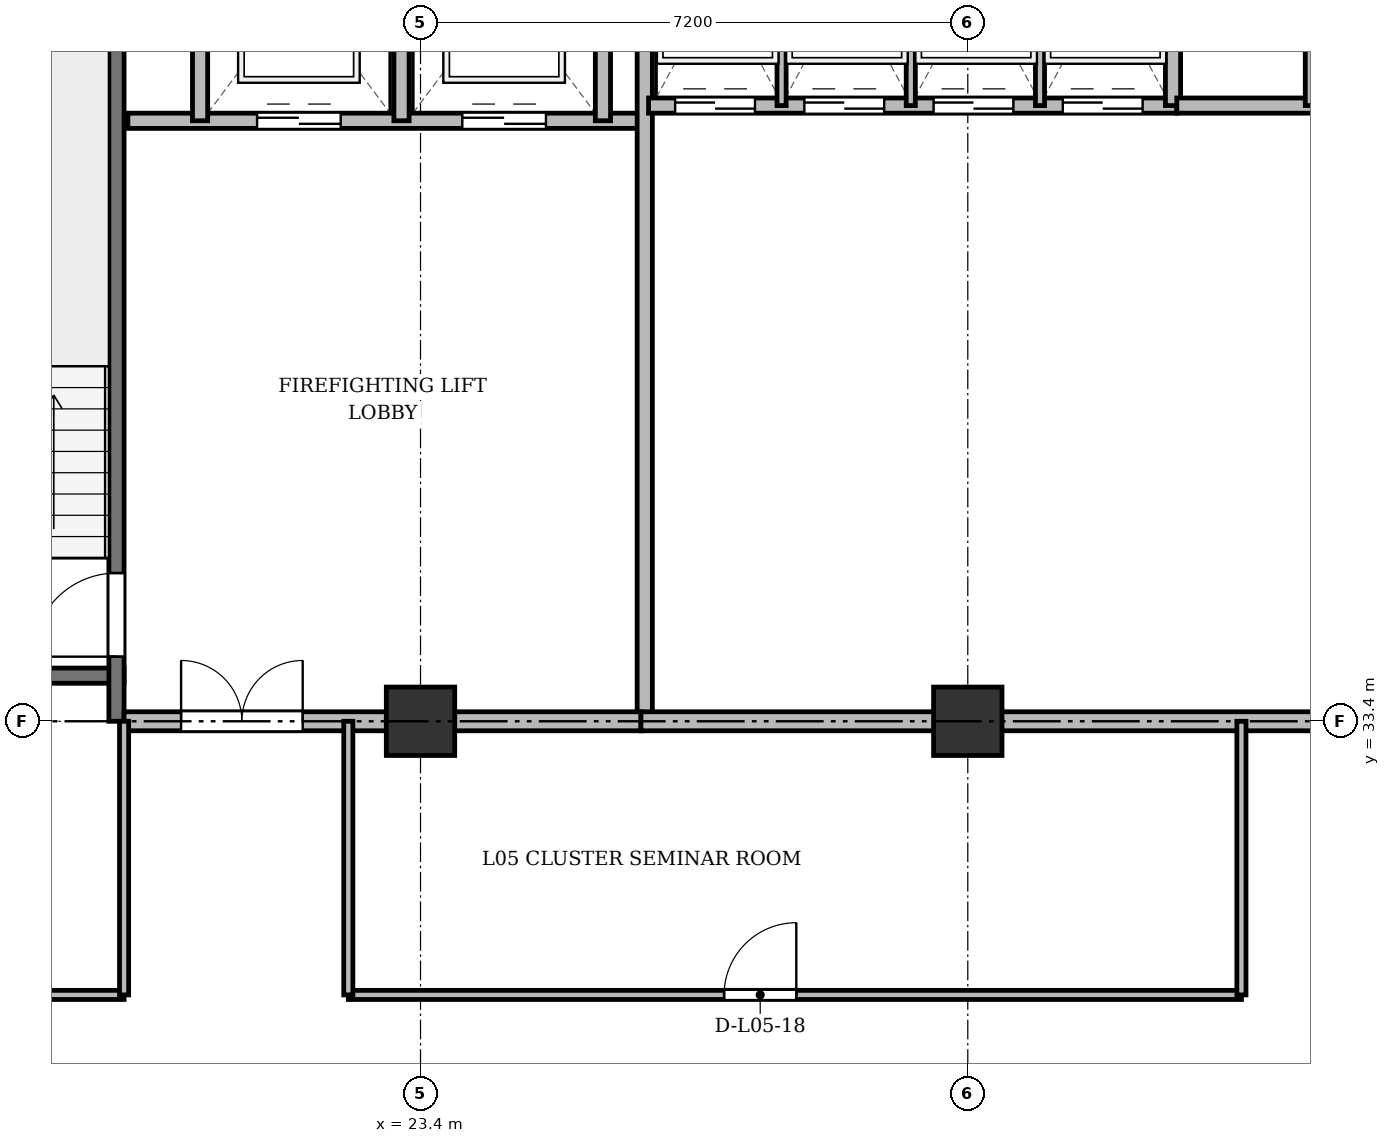
"""IFC4 building model, lengths in metres.
Left out: names, types, materials, properties, quantities, classifications, styles, units other than length and angle.
Written with IfcOpenShell. Run it as: python <this file> out.ifc"""

import sys

from ifc_helpers import new_model, si_unit, direction, frame, frame_2d, origin, origin_2d, place, context, subcontext, project, spatial, rectangle, extrude, source, transform, mapped, element, fill, save


model = new_model("IFC4")
c1 = context("Model", 3, precision=1e-05, world=origin(), true_north=direction((0.0, 1.0)))
c2 = subcontext(c1, "Body", "Model", "MODEL_VIEW")
j1 = project(units=[si_unit("LENGTHUNIT", "METRE"), si_unit("PLANEANGLEUNIT", "RADIAN")], contexts=[c1])
p1 = place(None, origin())
s1 = spatial("IfcSite", under=j1, at=p1, CompositionType="ELEMENT")
p2 = place(p1, origin())
s2 = spatial("IfcBuilding", under=s1, at=p2, CompositionType="ELEMENT")
p3 = place(p2, frame((0.0, 0.0, 23.5)))
s3 = spatial("IfcBuildingStorey", under=s2, at=p3, CompositionType="ELEMENT", Elevation=23.5)
m1 = source(origin(), c2, "Body", "SweptSolid", [
    extrude(rectangle(XDim=0.9, YDim=0.9, at=origin_2d()), origin(), (0.0, 0.0, 1.0), 3.6),
])
for number, where, z_axis, x_axis in (
    (1, (23.4, 33.4, 0.0), (0.0, 0.0, 1.0), (1.0, 0.0, 0.0)),
    (2, (30.6, 33.4, 0.0), (0.0, 0.0, 1.0), (1.0, 0.0, 0.0)),
):
    element("IfcColumn", number, at=place(p3, frame(where, z_axis=z_axis, x_axis=x_axis)), inside=s3, PredefinedType="COLUMN", context=c2, shape_type="MappedRepresentation", body=[
        mapped(m1, transform((0.0, 0.0, 0.0), x_axis=(1.0, 0.0, 0.0), y_axis=(0.0, 1.0, 0.0), z_axis=(0.0, 0.0, 1.0), scale=1.0)),
    ])
p4 = place(p3, frame((16.1, 34.0, 0.0), z_axis=(0.0, 0.0, 1.0), x_axis=(1.0, 0.0, 0.0)))
e3 = element("IfcWall", 3, at=p4, inside=s3, PredefinedType="SHEAR", context=c2, shape_type="SweptSolid", body=[
    extrude(rectangle(XDim=3.4, YDim=0.2, at=frame_2d((1.7, 0.0))), origin(), (0.0, 0.0, 1.0), 3.34),
])
p5 = place(p3, frame((19.4, 33.4, 0.0), z_axis=(0.0, 0.0, 1.0), x_axis=(0.0, 1.0, 0.0)))
e4 = element("IfcWall", 4, at=p5, inside=s3, PredefinedType="SHEAR", context=c2, shape_type="SweptSolid", body=[
    extrude(rectangle(XDim=11.1, YDim=0.2, at=frame_2d((5.55, 0.0))), origin(), (0.0, 0.0, 1.0), 3.34),
])
p6 = place(p5, frame((0.85, 0.0, 0.0)))
e5 = element("IfcOpeningElement", 5, at=p6, cuts=e4, PredefinedType="OPENING", context=c2, shape_type="SweptSolid", body=[
    extrude(rectangle(XDim=1.1, YDim=2.15, at=frame_2d((0.55, 1.075))), frame((0.0, 0.11, 0.0), z_axis=(0.0, -1.0, 0.0), x_axis=(1.0, 0.0, 0.0)), (0.0, 0.0, 1.0), 0.22),
])
p7 = place(p3, frame((19.55, 41.3, 0.0), z_axis=(0.0, 0.0, 1.0), x_axis=(1.0, 0.0, 0.0)))
e6 = element("IfcWall", 6, at=p7, inside=s3, PredefinedType="SOLIDWALL", context=c2, shape_type="SweptSolid", body=[
    extrude(rectangle(XDim=6.75, YDim=0.2, at=frame_2d((3.375, 0.0))), origin(), (0.0, 0.0, 1.0), 3.34),
])
p8 = place(p7, frame((1.7, 0.0, 0.0)))
e7 = element("IfcOpeningElement", 7, at=p8, cuts=e6, PredefinedType="OPENING", context=c2, shape_type="SweptSolid", body=[
    extrude(rectangle(XDim=1.1, YDim=2.15, at=frame_2d((0.55, 1.075))), frame((0.0, 0.11, 0.0), z_axis=(0.0, -1.0, 0.0), x_axis=(1.0, 0.0, 0.0)), (0.0, 0.0, 1.0), 0.22),
])
p9 = place(p7, frame((4.4, 0.0, 0.0)))
e8 = element("IfcOpeningElement", 8, at=p9, cuts=e6, PredefinedType="OPENING", context=c2, shape_type="SweptSolid", body=[
    extrude(rectangle(XDim=1.1, YDim=2.15, at=frame_2d((0.55, 1.075))), frame((0.0, 0.11, 0.0), z_axis=(0.0, -1.0, 0.0), x_axis=(1.0, 0.0, 0.0)), (0.0, 0.0, 1.0), 0.22),
])
for number, where, z_axis, x_axis in (
    (9, (20.5, 41.3, 0.0), (0.0, 0.0, 1.0), (0.0, 1.0, 0.0)),
    (10, (23.15, 41.3, 0.0), (0.0, 0.0, 1.0), (0.0, 1.0, 0.0)),
    (11, (25.8, 41.3, 0.0), (0.0, 0.0, 1.0), (0.0, 1.0, 0.0)),
):
    element("IfcWall", number, at=place(p3, frame(where, z_axis=z_axis, x_axis=x_axis)), inside=s3, PredefinedType="SOLIDWALL", context=c2, shape_type="SweptSolid", body=[
        extrude(rectangle(XDim=3.4, YDim=0.2, at=frame_2d((1.7, 0.0))), origin(), (0.0, 0.0, 1.0), 3.34),
    ])
p10 = place(p3, frame((26.35, 33.4, 0.0), z_axis=(0.0, 0.0, 1.0), x_axis=(0.0, 1.0, 0.0)))
e12 = element("IfcWall", 12, at=p10, inside=s3, PredefinedType="SOLIDWALL", context=c2, shape_type="SweptSolid", body=[
    extrude(rectangle(XDim=11.3, YDim=0.2, at=frame_2d((5.65, 0.0))), origin(), (0.0, 0.0, 1.0), 2.69),
])
p11 = place(p3, frame((19.5, 33.4, 0.0), z_axis=(0.0, 0.0, 1.0), x_axis=(1.0, 0.0, 0.0)))
e13 = element("IfcWall", 13, at=p11, inside=s3, PredefinedType="PARTITIONING", context=c2, shape_type="SweptSolid", body=[
    extrude(rectangle(XDim=6.8, YDim=0.25, at=frame_2d((3.4, 0.0))), origin(), (0.0, 0.0, 1.0), 2.69),
])
p12 = place(p11, frame((0.75, 0.0, 0.0)))
e14 = element("IfcOpeningElement", 14, at=p12, cuts=e13, PredefinedType="OPENING", context=c2, shape_type="SweptSolid", body=[
    extrude(rectangle(XDim=1.6, YDim=2.2, at=frame_2d((0.8, 1.1))), frame((0.0, 0.135, 0.0), z_axis=(0.0, -1.0, 0.0), x_axis=(1.0, 0.0, 0.0)), (0.0, 0.0, 1.0), 0.27),
])
p13 = place(p3, frame((26.4, 41.5, 0.0), z_axis=(0.0, 0.0, 1.0), x_axis=(1.0, 0.0, 0.0)))
e15 = element("IfcWall", 15, at=p13, inside=s3, PredefinedType="SOLIDWALL", context=c2, shape_type="SweptSolid", body=[
    extrude(rectangle(XDim=6.95, YDim=0.2, at=frame_2d((3.475, 0.0))), origin(), (0.0, 0.0, 1.0), 3.34),
])
p14 = place(p13, frame((0.35, 0.0, 0.0)))
e16 = element("IfcOpeningElement", 16, at=p14, cuts=e15, PredefinedType="OPENING", context=c2, shape_type="SweptSolid", body=[
    extrude(rectangle(XDim=1.05, YDim=2.15, at=frame_2d((0.525, 1.075))), frame((0.0, 0.11, 0.0), z_axis=(0.0, -1.0, 0.0), x_axis=(1.0, 0.0, 0.0)), (0.0, 0.0, 1.0), 0.22),
])
p15 = place(p13, frame((2.05, 0.0, 0.0)))
e17 = element("IfcOpeningElement", 17, at=p15, cuts=e15, PredefinedType="OPENING", context=c2, shape_type="SweptSolid", body=[
    extrude(rectangle(XDim=1.05, YDim=2.15, at=frame_2d((0.525, 1.075))), frame((0.0, 0.11, 0.0), z_axis=(0.0, -1.0, 0.0), x_axis=(1.0, 0.0, 0.0)), (0.0, 0.0, 1.0), 0.22),
])
p16 = place(p13, frame((3.75, 0.0, 0.0)))
e18 = element("IfcOpeningElement", 18, at=p16, cuts=e15, PredefinedType="OPENING", context=c2, shape_type="SweptSolid", body=[
    extrude(rectangle(XDim=1.05, YDim=2.15, at=frame_2d((0.525, 1.075))), frame((0.0, 0.11, 0.0), z_axis=(0.0, -1.0, 0.0), x_axis=(1.0, 0.0, 0.0)), (0.0, 0.0, 1.0), 0.22),
])
p17 = place(p13, frame((5.45, 0.0, 0.0)))
e19 = element("IfcOpeningElement", 19, at=p17, cuts=e15, PredefinedType="OPENING", context=c2, shape_type="SweptSolid", body=[
    extrude(rectangle(XDim=1.05, YDim=2.15, at=frame_2d((0.525, 1.075))), frame((0.0, 0.11, 0.0), z_axis=(0.0, -1.0, 0.0), x_axis=(1.0, 0.0, 0.0)), (0.0, 0.0, 1.0), 0.22),
])
p18 = place(p3, frame((33.3, 41.5, 0.0), z_axis=(0.0, 0.0, 1.0), x_axis=(0.0, 1.0, 0.0)))
e20 = element("IfcWall", 20, at=p18, inside=s3, PredefinedType="SOLIDWALL", context=c2, shape_type="SweptSolid", body=[
    extrude(rectangle(XDim=3.2, YDim=0.2, at=frame_2d((1.6, 0.0))), origin(), (0.0, 0.0, 1.0), 3.34),
])
for number, where, z_axis, x_axis in (
    (21, (28.15, 41.5, 0.0), (0.0, 0.0, 1.0), (0.0, 1.0, 0.0)),
    (22, (29.85, 41.5, 0.0), (0.0, 0.0, 1.0), (0.0, 1.0, 0.0)),
    (23, (31.55, 41.5, 0.0), (0.0, 0.0, 1.0), (0.0, 1.0, 0.0)),
):
    element("IfcWall", number, at=place(p3, frame(where, z_axis=z_axis, x_axis=x_axis)), inside=s3, PredefinedType="PARTITIONING", context=c2, shape_type="SweptSolid", body=[
        extrude(rectangle(XDim=3.2, YDim=0.12, at=frame_2d((1.6, 0.0))), origin(), (0.0, 0.0, 1.0), 3.34),
    ])
p19 = place(p3, frame((33.35, 41.5, 0.0), z_axis=(0.0, 0.0, 1.0), x_axis=(1.0, 0.0, 0.0)))
e24 = element("IfcWall", 24, at=p19, inside=s3, PredefinedType="SOLIDWALL", context=c2, shape_type="SweptSolid", body=[
    extrude(rectangle(XDim=6.9, YDim=0.2, at=frame_2d((3.45, 0.0))), origin(), (0.0, 0.0, 1.0), 3.34),
])
p20 = place(p3, frame((35.1, 41.5, 0.0), z_axis=(0.0, 0.0, 1.0), x_axis=(0.0, 1.0, 0.0)))
e25 = element("IfcWall", 25, at=p20, inside=s3, PredefinedType="PARTITIONING", context=c2, shape_type="SweptSolid", body=[
    extrude(rectangle(XDim=3.2, YDim=0.12, at=frame_2d((1.6, 0.0))), origin(), (0.0, 0.0, 1.0), 3.34),
])
p21 = place(p3, frame((26.3, 33.4, 0.0), z_axis=(0.0, 0.0, 1.0), x_axis=(1.0, 0.0, 0.0)))
e26 = element("IfcWall", 26, at=p21, inside=s3, PredefinedType="PARTITIONING", context=c2, shape_type="SweptSolid", body=[
    extrude(rectangle(XDim=20.85, YDim=0.25, at=frame_2d((10.425, 0.0))), origin(), (0.0, 0.0, 1.0), 2.69),
])
p22 = place(p21, frame((9.2, 0.0, 0.0)))
e27 = element("IfcOpeningElement", 27, at=p22, cuts=e26, PredefinedType="OPENING", context=c2, shape_type="SweptSolid", body=[
    extrude(rectangle(XDim=1.6, YDim=2.2, at=frame_2d((0.8, 1.1))), frame((0.0, 0.135, 0.0), z_axis=(0.0, -1.0, 0.0), x_axis=(1.0, 0.0, 0.0)), (0.0, 0.0, 1.0), 0.27),
])
p23 = place(p3, frame((4.75, 29.8, 0.0), z_axis=(0.0, 0.0, 1.0), x_axis=(1.0, 0.0, 0.0)))
e28 = element("IfcWall", 28, at=p23, inside=s3, PredefinedType="PARTITIONING", context=c2, shape_type="SweptSolid", body=[
    extrude(rectangle(XDim=14.75, YDim=0.12, at=frame_2d((7.375, 0.0))), origin(), (0.0, 0.0, 1.0), 2.752),
])
p24 = place(p23, frame((6.9, 0.0, 0.0)))
e29 = element("IfcOpeningElement", 29, at=p24, cuts=e28, PredefinedType="OPENING", context=c2, shape_type="SweptSolid", body=[
    extrude(rectangle(XDim=0.95, YDim=2.15, at=frame_2d((0.475, 1.075))), frame((0.0, 0.07, 0.0), z_axis=(0.0, -1.0, 0.0), x_axis=(1.0, 0.0, 0.0)), (0.0, 0.0, 1.0), 0.14),
])
p25 = place(p3, frame((22.45, 29.8, 0.0), z_axis=(0.0, 0.0, 1.0), x_axis=(1.0, 0.0, 0.0)))
e30 = element("IfcWall", 30, at=p25, inside=s3, PredefinedType="PARTITIONING", context=c2, shape_type="SweptSolid", body=[
    extrude(rectangle(XDim=11.75, YDim=0.12, at=frame_2d((5.875, 0.0))), origin(), (0.0, 0.0, 1.0), 2.752),
])
p26 = place(p25, frame((4.944, 0.0, 0.0)))
e31 = element("IfcOpeningElement", 31, at=p26, cuts=e30, PredefinedType="OPENING", context=c2, shape_type="SweptSolid", body=[
    extrude(rectangle(XDim=0.95, YDim=2.15, at=frame_2d((0.475, 1.075))), frame((0.0, 0.07, 0.0), z_axis=(0.0, -1.0, 0.0), x_axis=(1.0, 0.0, 0.0)), (0.0, 0.0, 1.0), 0.14),
])
for number, where, z_axis, x_axis in (
    (32, (19.5, 29.8, 0.0), (0.0, 0.0, 1.0), (0.0, 1.0, 0.0)),
    (33, (22.45, 29.8, 0.0), (0.0, 0.0, 1.0), (0.0, 1.0, 0.0)),
    (34, (34.2, 29.8, 0.0), (0.0, 0.0, 1.0), (0.0, 1.0, 0.0)),
):
    element("IfcWall", number, at=place(p3, frame(where, z_axis=z_axis, x_axis=x_axis)), inside=s3, PredefinedType="PARTITIONING", context=c2, shape_type="SweptSolid", body=[
        extrude(rectangle(XDim=3.6, YDim=0.12, at=frame_2d((1.8, 0.0))), origin(), (0.0, 0.0, 1.0), 2.69),
    ])
m2 = source(origin(), c2, "Body", "SweptSolid", [
    extrude(rectangle(XDim=1.1, YDim=2.15, at=frame_2d((0.55, 1.075))), frame((0.0, 0.025, 0.0), z_axis=(0.0, -1.0, 0.0), x_axis=(1.0, 0.0, 0.0)), (0.0, 0.0, 1.0), 0.05),
])
p27 = place(p6, origin())
e35 = element("IfcDoor", 35, at=p27, inside=s3, OperationType="SINGLE_SWING_LEFT", PredefinedType="DOOR", context=c2, shape_type="MappedRepresentation", body=[
    mapped(m2, transform((0.0, 0.0, 0.0), x_axis=(1.0, 0.0, 0.0), y_axis=(0.0, 1.0, 0.0), z_axis=(0.0, 0.0, 1.0), scale=1.0)),
])
fill(e5, e35)
p28 = place(p8, origin())
e36 = element("IfcDoor", 36, at=p28, inside=s3, OperationType="DOUBLE_DOOR_SLIDING", PredefinedType="DOOR", context=c2, shape_type="MappedRepresentation", body=[
    mapped(m2, transform((0.0, 0.0, 0.0), x_axis=(1.0, 0.0, 0.0), y_axis=(0.0, 1.0, 0.0), z_axis=(0.0, 0.0, 1.0), scale=1.0)),
])
fill(e7, e36)
p29 = place(p9, origin())
e37 = element("IfcDoor", 37, at=p29, inside=s3, OperationType="DOUBLE_DOOR_SLIDING", PredefinedType="DOOR", context=c2, shape_type="MappedRepresentation", body=[
    mapped(m2, transform((0.0, 0.0, 0.0), x_axis=(1.0, 0.0, 0.0), y_axis=(0.0, 1.0, 0.0), z_axis=(0.0, 0.0, 1.0), scale=1.0)),
])
fill(e8, e37)
m3 = source(origin(), c2, "Body", "SweptSolid", [
    extrude(rectangle(XDim=1.6, YDim=2.2, at=frame_2d((0.8, 1.1))), frame((0.0, 0.025, 0.0), z_axis=(0.0, -1.0, 0.0), x_axis=(1.0, 0.0, 0.0)), (0.0, 0.0, 1.0), 0.05),
])
p30 = place(p12, origin())
e38 = element("IfcDoor", 38, at=p30, inside=s3, OperationType="DOUBLE_DOOR_SINGLE_SWING", PredefinedType="DOOR", context=c2, shape_type="MappedRepresentation", body=[
    mapped(m3, transform((0.0, 0.0, 0.0), x_axis=(1.0, 0.0, 0.0), y_axis=(0.0, 1.0, 0.0), z_axis=(0.0, 0.0, 1.0), scale=1.0)),
])
fill(e14, e38)
m4 = source(origin(), c2, "Body", "SweptSolid", [
    extrude(rectangle(XDim=1.05, YDim=2.15, at=frame_2d((0.525, 1.075))), frame((0.0, 0.025, 0.0), z_axis=(0.0, -1.0, 0.0), x_axis=(1.0, 0.0, 0.0)), (0.0, 0.0, 1.0), 0.05),
])
p31 = place(p14, origin())
e39 = element("IfcDoor", 39, at=p31, inside=s3, OperationType="DOUBLE_DOOR_SLIDING", PredefinedType="DOOR", context=c2, shape_type="MappedRepresentation", body=[
    mapped(m4, transform((0.0, 0.0, 0.0), x_axis=(1.0, 0.0, 0.0), y_axis=(0.0, 1.0, 0.0), z_axis=(0.0, 0.0, 1.0), scale=1.0)),
])
fill(e16, e39)
p32 = place(p15, origin())
e40 = element("IfcDoor", 40, at=p32, inside=s3, OperationType="DOUBLE_DOOR_SLIDING", PredefinedType="DOOR", context=c2, shape_type="MappedRepresentation", body=[
    mapped(m4, transform((0.0, 0.0, 0.0), x_axis=(1.0, 0.0, 0.0), y_axis=(0.0, 1.0, 0.0), z_axis=(0.0, 0.0, 1.0), scale=1.0)),
])
fill(e17, e40)
p33 = place(p16, origin())
e41 = element("IfcDoor", 41, at=p33, inside=s3, OperationType="DOUBLE_DOOR_SLIDING", PredefinedType="DOOR", context=c2, shape_type="MappedRepresentation", body=[
    mapped(m4, transform((0.0, 0.0, 0.0), x_axis=(1.0, 0.0, 0.0), y_axis=(0.0, 1.0, 0.0), z_axis=(0.0, 0.0, 1.0), scale=1.0)),
])
fill(e18, e41)
p34 = place(p17, origin())
e42 = element("IfcDoor", 42, at=p34, inside=s3, OperationType="DOUBLE_DOOR_SLIDING", PredefinedType="DOOR", context=c2, shape_type="MappedRepresentation", body=[
    mapped(m4, transform((0.0, 0.0, 0.0), x_axis=(1.0, 0.0, 0.0), y_axis=(0.0, 1.0, 0.0), z_axis=(0.0, 0.0, 1.0), scale=1.0)),
])
fill(e19, e42)
m5 = source(origin(), c2, "Body", "SweptSolid", [
    extrude(rectangle(XDim=0.95, YDim=2.15, at=frame_2d((0.475, 1.075))), frame((0.0, 0.025, 0.0), z_axis=(0.0, -1.0, 0.0), x_axis=(1.0, 0.0, 0.0)), (0.0, 0.0, 1.0), 0.05),
])
p35 = place(p26, origin())
e43 = element("IfcDoor", 43, at=p35, inside=s3, OperationType="SINGLE_SWING_RIGHT", PredefinedType="DOOR", context=c2, shape_type="MappedRepresentation", body=[
    mapped(m5, transform((0.0, 0.0, 0.0), x_axis=(1.0, 0.0, 0.0), y_axis=(0.0, 1.0, 0.0), z_axis=(0.0, 0.0, 1.0), scale=1.0)),
])
fill(e31, e43)
save(model, sys.argv[1])
